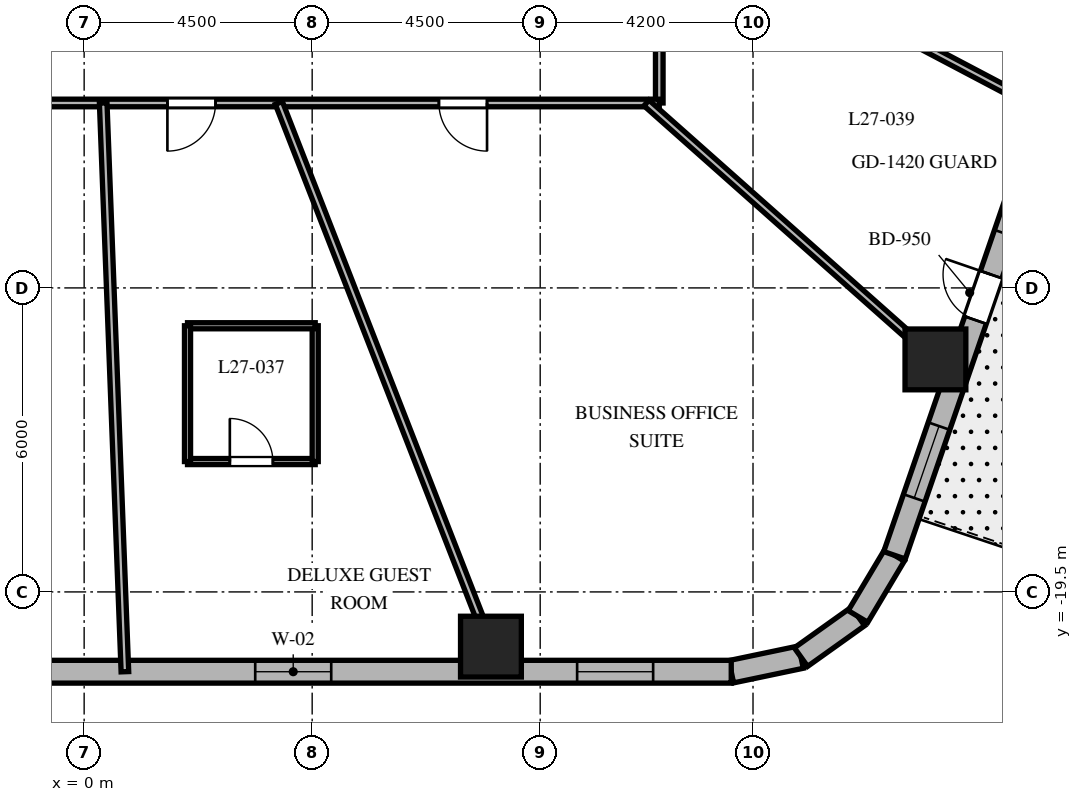
"""IFC4 building model, lengths in metres.
Left out: names, types, materials, properties, quantities, classifications, styles, units other than length and angle.
Written with IfcOpenShell. Run it as: python <this file> out.ifc"""

import sys

from ifc_helpers import new_model, si_unit, direction, frame, frame_2d, origin, origin_2d, place, context, subcontext, project, spatial, rectangle, extrude, element, fill, save


model = new_model("IFC4")
c1 = context("Model", 3, precision=1e-05, world=origin(), true_north=direction((0.0, 1.0)))
c2 = subcontext(c1, "Body", "Model", "MODEL_VIEW")
j1 = project(units=[si_unit("LENGTHUNIT", "METRE"), si_unit("PLANEANGLEUNIT", "RADIAN")], contexts=[c1])
p1 = place(None, origin())
s1 = spatial("IfcSite", under=j1, at=p1, CompositionType="ELEMENT")
p2 = place(p1, origin())
s2 = spatial("IfcBuilding", under=s1, at=p2, CompositionType="ELEMENT")
p3 = place(p2, frame((0.0, 0.0, 113.6)))
s3 = spatial("IfcBuildingStorey", under=s2, at=p3, CompositionType="ELEMENT", Elevation=113.6)
for number, where, z_axis, x_axis in (
    (1, (8.028, -20.58, 0.0), (0.0, 0.0, 1.0), (1.0, 0.0, 0.0)),
    (2, (16.8, -14.911, 0.0), (0.0, 0.0, 1.0), (1.0, 0.0, 0.0)),
):
    element("IfcColumn", number, at=place(p3, frame(where, z_axis=z_axis, x_axis=x_axis)), inside=s3, PredefinedType="COLUMN", context=c2, shape_type="SweptSolid", body=[
        extrude(rectangle(XDim=1.2, YDim=1.2, at=origin_2d()), origin(), (0.0, 0.0, 1.0), 3.7),
    ])
p4 = place(p3, frame((12.771, -21.075, 0.0), z_axis=(0.0, 0.0, 1.0), x_axis=(0.97874281988, 0.205091424819, 0.0)))
e3 = element("IfcWall", 3, at=p4, inside=s3, PredefinedType="SOLIDWALL", context=c2, shape_type="SweptSolid", body=[
    extrude(rectangle(XDim=1.406, YDim=0.45, at=frame_2d((0.703, 0.0))), origin(), (0.0, 0.0, 1.0), 3.4),
])
p5 = place(p3, frame((14.146, -20.787, 0.0), z_axis=(0.0, 0.0, 1.0), x_axis=(0.814162929117, 0.580636482536, 0.0)))
e4 = element("IfcWall", 4, at=p5, inside=s3, PredefinedType="SOLIDWALL", context=c2, shape_type="SweptSolid", body=[
    extrude(rectangle(XDim=1.382, YDim=0.45, at=frame_2d((0.691, 0.0))), origin(), (0.0, 0.0, 1.0), 3.4),
])
p6 = place(p3, frame((15.272, -19.984, 0.0), z_axis=(0.0, 0.0, 1.0), x_axis=(0.512579347361, 0.858639862025, 0.0)))
e5 = element("IfcWall", 5, at=p6, inside=s3, PredefinedType="SOLIDWALL", context=c2, shape_type="SweptSolid", body=[
    extrude(rectangle(XDim=1.406, YDim=0.45, at=frame_2d((0.703, 0.0))), origin(), (0.0, 0.0, 1.0), 3.4),
])
p7 = place(p3, frame((-11.012, -21.075, 0.0), z_axis=(0.0, 0.0, 1.0), x_axis=(1.0, 0.0, 0.0)))
e6 = element("IfcWall", 6, at=p7, inside=s3, PredefinedType="SOLIDWALL", context=c2, shape_type="SweptSolid", body=[
    extrude(rectangle(XDim=23.782, YDim=0.45, at=frame_2d((11.891, 0.0))), origin(), (0.0, 0.0, 1.0), 3.4),
])
p8 = place(p7, frame((1.542, 0.0, 0.8)))
e7 = element("IfcOpeningElement", 7, at=p8, cuts=e6, PredefinedType="OPENING", context=c2, shape_type="SweptSolid", body=[
    extrude(rectangle(XDim=1.5, YDim=1.8, at=frame_2d((0.75, 0.9))), frame((0.0, 0.235, 0.0), z_axis=(0.0, -1.0, 0.0), x_axis=(1.0, 0.0, 0.0)), (0.0, 0.0, 1.0), 0.47),
])
p9 = place(p7, frame((7.82, 0.0, 0.8)))
e8 = element("IfcOpeningElement", 8, at=p9, cuts=e6, PredefinedType="OPENING", context=c2, shape_type="SweptSolid", body=[
    extrude(rectangle(XDim=1.5, YDim=1.8, at=frame_2d((0.75, 0.9))), frame((0.0, 0.235, 0.0), z_axis=(0.0, -1.0, 0.0), x_axis=(1.0, 0.0, 0.0)), (0.0, 0.0, 1.0), 0.47),
])
p10 = place(p7, frame((14.388, 0.0, 0.8)))
e9 = element("IfcOpeningElement", 9, at=p10, cuts=e6, PredefinedType="OPENING", context=c2, shape_type="SweptSolid", body=[
    extrude(rectangle(XDim=1.5, YDim=1.8, at=frame_2d((0.75, 0.9))), frame((0.0, 0.235, 0.0), z_axis=(0.0, -1.0, 0.0), x_axis=(1.0, 0.0, 0.0)), (0.0, 0.0, 1.0), 0.47),
])
p11 = place(p7, frame((20.741, 0.0, 0.8)))
e10 = element("IfcOpeningElement", 10, at=p11, cuts=e6, PredefinedType="OPENING", context=c2, shape_type="SweptSolid", body=[
    extrude(rectangle(XDim=1.5, YDim=1.8, at=frame_2d((0.75, 0.9))), frame((0.0, 0.235, 0.0), z_axis=(0.0, -1.0, 0.0), x_axis=(1.0, 0.0, 0.0)), (0.0, 0.0, 1.0), 0.47),
])
p12 = place(p3, frame((15.992, -18.777, 0.0), z_axis=(0.0, 0.0, 1.0), x_axis=(0.325606988926, 0.945505202927, 0.0)))
e11 = element("IfcWall", 11, at=p12, inside=s3, PredefinedType="SOLIDWALL", context=c2, shape_type="SweptSolid", body=[
    extrude(rectangle(XDim=19.669, YDim=0.45, at=frame_2d((9.835, 0.0))), origin(), (0.0, 0.0, 1.0), 3.4),
])
p13 = place(p12, frame((4.909, 0.0, 0.0)))
e12 = element("IfcOpeningElement", 12, at=p13, cuts=e11, PredefinedType="OPENING", context=c2, shape_type="SweptSolid", body=[
    extrude(rectangle(XDim=0.95, YDim=2.15, at=frame_2d((0.475, 1.075))), frame((0.0, 0.235, 0.0), z_axis=(0.0, -1.0, 0.0), x_axis=(1.0, 0.0, 0.0)), (0.0, 0.0, 1.0), 0.47),
])
p14 = place(p12, frame((1.197, 0.0, 0.8)))
e13 = element("IfcOpeningElement", 13, at=p14, cuts=e11, PredefinedType="OPENING", context=c2, shape_type="SweptSolid", body=[
    extrude(rectangle(XDim=1.5, YDim=1.8, at=frame_2d((0.75, 0.9))), frame((0.0, 0.235, 0.0), z_axis=(0.0, -1.0, 0.0), x_axis=(1.0, 0.0, 0.0)), (0.0, 0.0, 1.0), 0.47),
])
p15 = place(p12, frame((6.714, 0.0, 0.8)))
e14 = element("IfcOpeningElement", 14, at=p15, cuts=e11, PredefinedType="OPENING", context=c2, shape_type="SweptSolid", body=[
    extrude(rectangle(XDim=1.5, YDim=1.8, at=frame_2d((0.75, 0.9))), frame((0.0, 0.235, 0.0), z_axis=(0.0, -1.0, 0.0), x_axis=(1.0, 0.0, 0.0)), (0.0, 0.0, 1.0), 0.47),
])
p16 = place(p12, frame((11.53, 0.0, 0.8)))
e15 = element("IfcOpeningElement", 15, at=p16, cuts=e11, PredefinedType="OPENING", context=c2, shape_type="SweptSolid", body=[
    extrude(rectangle(XDim=1.5, YDim=1.8, at=frame_2d((0.75, 0.9))), frame((0.0, 0.235, 0.0), z_axis=(0.0, -1.0, 0.0), x_axis=(1.0, 0.0, 0.0)), (0.0, 0.0, 1.0), 0.47),
])
p17 = place(p12, frame((16.918, 0.0, 0.8)))
e16 = element("IfcOpeningElement", 16, at=p17, cuts=e11, PredefinedType="OPENING", context=c2, shape_type="SweptSolid", body=[
    extrude(rectangle(XDim=1.5, YDim=1.8, at=frame_2d((0.75, 0.9))), frame((0.0, 0.235, 0.0), z_axis=(0.0, -1.0, 0.0), x_axis=(1.0, 0.0, 0.0)), (0.0, 0.0, 1.0), 0.47),
])
p18 = place(p3, frame((11.35, 9.85, 0.0), z_axis=(0.0, 0.0, 1.0), x_axis=(0.0, -1.0, 0.0)))
e17 = element("IfcWall", 17, at=p18, inside=s3, PredefinedType="PARTITIONING", context=c2, shape_type="SweptSolid", body=[
    extrude(rectangle(XDim=19.7, YDim=0.15, at=frame_2d((9.85, 0.0))), origin(), (0.0, 0.0, 1.0), 2.84),
])
p19 = place(p18, frame((4.199, 0.0, 0.0)))
e18 = element("IfcOpeningElement", 18, at=p19, cuts=e17, PredefinedType="OPENING", context=c2, shape_type="SweptSolid", body=[
    extrude(rectangle(XDim=0.95, YDim=2.03, at=frame_2d((0.475, 1.015))), frame((0.0, 0.085, 0.0), z_axis=(0.0, -1.0, 0.0), x_axis=(1.0, 0.0, 0.0)), (0.0, 0.0, 1.0), 0.17),
])
p20 = place(p18, frame((1.002, 0.0, 0.0)))
e19 = element("IfcOpeningElement", 19, at=p20, cuts=e17, PredefinedType="OPENING", context=c2, shape_type="SweptSolid", body=[
    extrude(rectangle(XDim=0.9, YDim=2.03, at=frame_2d((0.45, 1.015))), frame((0.0, 0.085, 0.0), z_axis=(0.0, -1.0, 0.0), x_axis=(1.0, 0.0, 0.0)), (0.0, 0.0, 1.0), 0.17),
])
p21 = place(p18, frame((17.197, 0.0, 0.0)))
e20 = element("IfcOpeningElement", 20, at=p21, cuts=e17, PredefinedType="OPENING", context=c2, shape_type="SweptSolid", body=[
    extrude(rectangle(XDim=0.9, YDim=2.03, at=frame_2d((0.45, 1.015))), frame((0.0, 0.085, 0.0), z_axis=(0.0, -1.0, 0.0), x_axis=(1.0, 0.0, 0.0)), (0.0, 0.0, 1.0), 0.17),
])
p22 = place(p18, frame((13.408, 0.0, 0.0)))
e21 = element("IfcOpeningElement", 21, at=p22, cuts=e17, PredefinedType="OPENING", context=c2, shape_type="SweptSolid", body=[
    extrude(rectangle(XDim=0.95, YDim=2.03, at=frame_2d((0.475, 1.015))), frame((0.0, 0.085, 0.0), z_axis=(0.0, -1.0, 0.0), x_axis=(1.0, 0.0, 0.0)), (0.0, 0.0, 1.0), 0.17),
])
p23 = place(p18, frame((8.836, 0.0, 0.0)))
e22 = element("IfcOpeningElement", 22, at=p23, cuts=e17, PredefinedType="OPENING", context=c2, shape_type="SweptSolid", body=[
    extrude(rectangle(XDim=0.95, YDim=2.03, at=frame_2d((0.475, 1.015))), frame((0.0, 0.085, 0.0), z_axis=(0.0, -1.0, 0.0), x_axis=(1.0, 0.0, 0.0)), (0.0, 0.0, 1.0), 0.17),
])
p24 = place(p3, frame((11.35, -9.85, 0.0), z_axis=(0.0, 0.0, 1.0), x_axis=(-1.0, 0.0, 0.0)))
e23 = element("IfcWall", 23, at=p24, inside=s3, PredefinedType="PARTITIONING", context=c2, shape_type="SweptSolid", body=[
    extrude(rectangle(XDim=22.7, YDim=0.15, at=frame_2d((11.35, 0.0))), origin(), (0.0, 0.0, 1.0), 2.84),
])
p25 = place(p24, frame((17.237, 0.0, 0.0)))
e24 = element("IfcOpeningElement", 24, at=p25, cuts=e23, PredefinedType="OPENING", context=c2, shape_type="SweptSolid", body=[
    extrude(rectangle(XDim=0.95, YDim=2.03, at=frame_2d((0.475, 1.015))), frame((0.0, 0.085, 0.0), z_axis=(0.0, -1.0, 0.0), x_axis=(1.0, 0.0, 0.0)), (0.0, 0.0, 1.0), 0.17),
])
p26 = place(p24, frame((12.192, 0.0, 0.0)))
e25 = element("IfcOpeningElement", 25, at=p26, cuts=e23, PredefinedType="OPENING", context=c2, shape_type="SweptSolid", body=[
    extrude(rectangle(XDim=0.95, YDim=2.03, at=frame_2d((0.475, 1.015))), frame((0.0, 0.085, 0.0), z_axis=(0.0, -1.0, 0.0), x_axis=(1.0, 0.0, 0.0)), (0.0, 0.0, 1.0), 0.17),
])
p27 = place(p24, frame((8.757, 0.0, 0.0)))
e26 = element("IfcOpeningElement", 26, at=p27, cuts=e23, PredefinedType="OPENING", context=c2, shape_type="SweptSolid", body=[
    extrude(rectangle(XDim=0.95, YDim=2.03, at=frame_2d((0.475, 1.015))), frame((0.0, 0.085, 0.0), z_axis=(0.0, -1.0, 0.0), x_axis=(1.0, 0.0, 0.0)), (0.0, 0.0, 1.0), 0.17),
])
p28 = place(p24, frame((3.399, 0.0, 0.0)))
e27 = element("IfcOpeningElement", 27, at=p28, cuts=e23, PredefinedType="OPENING", context=c2, shape_type="SweptSolid", body=[
    extrude(rectangle(XDim=0.95, YDim=2.03, at=frame_2d((0.475, 1.015))), frame((0.0, 0.085, 0.0), z_axis=(0.0, -1.0, 0.0), x_axis=(1.0, 0.0, 0.0)), (0.0, 0.0, 1.0), 0.17),
])
p29 = place(p3, frame((0.376, -9.85, 0.0), z_axis=(0.0, 0.0, 1.0), x_axis=(0.03812177869, -0.999273100804, 0.0)))
e28 = element("IfcWall", 28, at=p29, inside=s3, PredefinedType="PARTITIONING", context=c2, shape_type="SweptSolid", body=[
    extrude(rectangle(XDim=11.233, YDim=0.15, at=frame_2d((5.616, 0.0))), origin(), (0.0, 0.0, 1.0), 2.54),
])
p30 = place(p3, frame((3.842, -9.85, 0.0), z_axis=(0.0, 0.0, 1.0), x_axis=(0.363432685593, -0.931620460833, 0.0)))
e29 = element("IfcWall", 29, at=p30, inside=s3, PredefinedType="PARTITIONING", context=c2, shape_type="SweptSolid", body=[
    extrude(rectangle(XDim=12.049, YDim=0.15, at=frame_2d((6.024, 0.0))), origin(), (0.0, 0.0, 1.0), 2.54),
])
p31 = place(p3, frame((11.098, -9.85, 0.0), z_axis=(0.0, 0.0, 1.0), x_axis=(0.747904295103, -0.663806572253, 0.0)))
e30 = element("IfcWall", 30, at=p31, inside=s3, PredefinedType="PARTITIONING", context=c2, shape_type="SweptSolid", body=[
    extrude(rectangle(XDim=8.16, YDim=0.15, at=frame_2d((4.08, 0.0))), origin(), (0.0, 0.0, 1.0), 2.54),
])
p32 = place(p3, frame((11.35, -5.983, 0.0), z_axis=(0.0, 0.0, 1.0), x_axis=(0.884597447182, -0.466355397137, 0.0)))
e31 = element("IfcWall", 31, at=p32, inside=s3, PredefinedType="PARTITIONING", context=c2, shape_type="SweptSolid", body=[
    extrude(rectangle(XDim=8.657, YDim=0.15, at=frame_2d((4.328, 0.0))), origin(), (0.0, 0.0, 1.0), 2.54),
])
p33 = place(p3, frame((2.04, -16.927, 0.0), z_axis=(0.0, 0.0, 1.0), x_axis=(1.0, 0.0, 0.0)))
e32 = element("IfcWall", 32, at=p33, inside=s3, PredefinedType="PARTITIONING", context=c2, shape_type="SweptSolid", body=[
    extrude(rectangle(XDim=2.52, YDim=0.12, at=frame_2d((1.26, 0.0))), origin(), (0.0, 0.0, 1.0), 3.4),
])
p34 = place(p33, frame((0.835, 0.0, 0.0)))
e33 = element("IfcOpeningElement", 33, at=p34, cuts=e32, PredefinedType="OPENING", context=c2, shape_type="SweptSolid", body=[
    extrude(rectangle(XDim=0.85, YDim=2.03, at=frame_2d((0.425, 1.015))), frame((0.0, 0.07, 0.0), z_axis=(0.0, -1.0, 0.0), x_axis=(1.0, 0.0, 0.0)), (0.0, 0.0, 1.0), 0.14),
])
p35 = place(p3, frame((4.56, -16.927, 0.0), z_axis=(0.0, 0.0, 1.0), x_axis=(0.0, 1.0, 0.0)))
e34 = element("IfcWall", 34, at=p35, inside=s3, PredefinedType="PARTITIONING", context=c2, shape_type="SweptSolid", body=[
    extrude(rectangle(XDim=2.68, YDim=0.12, at=frame_2d((1.34, 0.0))), origin(), (0.0, 0.0, 1.0), 2.84),
])
p36 = place(p3, frame((4.56, -14.247, 0.0), z_axis=(0.0, 0.0, 1.0), x_axis=(-1.0, 0.0, 0.0)))
e35 = element("IfcWall", 35, at=p36, inside=s3, PredefinedType="PARTITIONING", context=c2, shape_type="SweptSolid", body=[
    extrude(rectangle(XDim=2.52, YDim=0.12, at=frame_2d((1.26, 0.0))), origin(), (0.0, 0.0, 1.0), 3.4),
])
p37 = place(p3, frame((2.04, -14.247, 0.0), z_axis=(0.0, 0.0, 1.0), x_axis=(0.0, -1.0, 0.0)))
e36 = element("IfcWall", 36, at=p37, inside=s3, PredefinedType="PARTITIONING", context=c2, shape_type="SweptSolid", body=[
    extrude(rectangle(XDim=2.68, YDim=0.12, at=frame_2d((1.34, 0.0))), origin(), (0.0, 0.0, 1.0), 2.84),
])
p38 = place(p10, origin())
e37 = element("IfcWindow", 37, at=p38, inside=s3, PartitioningType="SINGLE_PANEL", PredefinedType="WINDOW", context=c2, shape_type="SweptSolid", body=[
    extrude(rectangle(XDim=1.5, YDim=1.8, at=frame_2d((0.75, 0.9))), frame((0.0, 0.03, 0.0), z_axis=(0.0, -1.0, 0.0), x_axis=(1.0, 0.0, 0.0)), (0.0, 0.0, 1.0), 0.06),
])
fill(e9, e37)
p39 = place(p11, origin())
e38 = element("IfcWindow", 38, at=p39, inside=s3, PartitioningType="SINGLE_PANEL", PredefinedType="WINDOW", context=c2, shape_type="SweptSolid", body=[
    extrude(rectangle(XDim=1.5, YDim=1.8, at=frame_2d((0.75, 0.9))), frame((0.0, 0.03, 0.0), z_axis=(0.0, -1.0, 0.0), x_axis=(1.0, 0.0, 0.0)), (0.0, 0.0, 1.0), 0.06),
])
fill(e10, e38)
p40 = place(p13, origin())
e39 = element("IfcDoor", 39, at=p40, inside=s3, OperationType="SINGLE_SWING_RIGHT", PredefinedType="DOOR", context=c2, shape_type="SweptSolid", body=[
    extrude(rectangle(XDim=0.95, YDim=2.15, at=frame_2d((0.475, 1.075))), frame((0.0, 0.025, 0.0), z_axis=(0.0, -1.0, 0.0), x_axis=(1.0, 0.0, 0.0)), (0.0, 0.0, 1.0), 0.05),
])
fill(e12, e39)
p41 = place(p14, origin())
e40 = element("IfcWindow", 40, at=p41, inside=s3, PartitioningType="SINGLE_PANEL", PredefinedType="WINDOW", context=c2, shape_type="SweptSolid", body=[
    extrude(rectangle(XDim=1.5, YDim=1.8, at=frame_2d((0.75, 0.9))), frame((0.0, 0.03, 0.0), z_axis=(0.0, -1.0, 0.0), x_axis=(1.0, 0.0, 0.0)), (0.0, 0.0, 1.0), 0.06),
])
fill(e13, e40)
p42 = place(p27, origin())
e41 = element("IfcDoor", 41, at=p42, inside=s3, OperationType="SINGLE_SWING_RIGHT", PredefinedType="DOOR", context=c2, shape_type="SweptSolid", body=[
    extrude(rectangle(XDim=0.95, YDim=2.03, at=frame_2d((0.475, 1.015))), frame((0.0, 0.025, 0.0), z_axis=(0.0, -1.0, 0.0), x_axis=(1.0, 0.0, 0.0)), (0.0, 0.0, 1.0), 0.05),
])
fill(e26, e41)
p43 = place(p34, origin())
e42 = element("IfcDoor", 42, at=p43, inside=s3, OperationType="SINGLE_SWING_LEFT", PredefinedType="DOOR", context=c2, shape_type="SweptSolid", body=[
    extrude(rectangle(XDim=0.85, YDim=2.03, at=frame_2d((0.425, 1.015))), frame((0.0, 0.025, 0.0), z_axis=(0.0, -1.0, 0.0), x_axis=(1.0, 0.0, 0.0)), (0.0, 0.0, 1.0), 0.05),
])
fill(e33, e42)
p44 = place(p28, origin())
e43 = element("IfcDoor", 43, at=p44, inside=s3, OperationType="SINGLE_SWING_LEFT", PredefinedType="DOOR", context=c2, shape_type="SweptSolid", body=[
    extrude(rectangle(XDim=0.95, YDim=2.03, at=frame_2d((0.475, 1.015))), frame((0.0, 0.025, 0.0), z_axis=(0.0, -1.0, 0.0), x_axis=(1.0, 0.0, 0.0)), (0.0, 0.0, 1.0), 0.05),
])
fill(e27, e43)
save(model, sys.argv[1])
